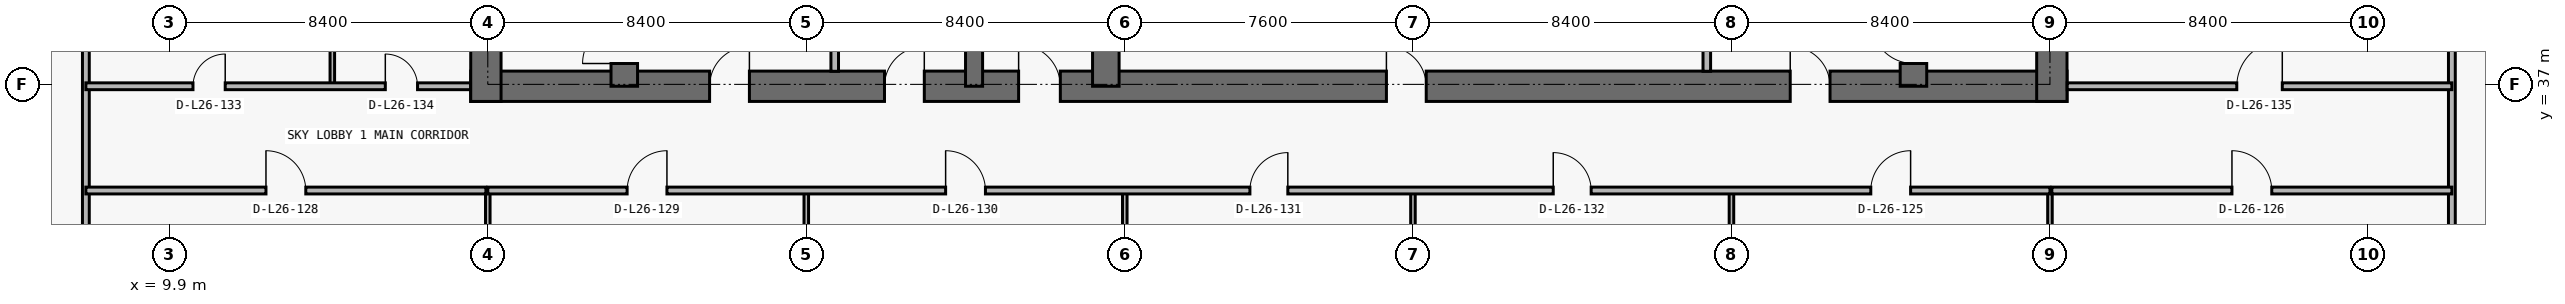
"""IFC4 building model, lengths in metres.
Left out: names, types, materials, properties, quantities, classifications, styles, units other than length and angle.
Written with IfcOpenShell. Run it as: python <this file> out.ifc"""

import sys

from ifc_helpers import new_model, si_unit, direction, frame, frame_2d, origin, place, context, subcontext, project, spatial, rectangle, extrude, element, fill, save


model = new_model("IFC4")
c1 = context("Model", 3, precision=1e-05, world=origin(), true_north=direction((0.0, 1.0)))
c2 = subcontext(c1, "Body", "Model", "MODEL_VIEW")
j1 = project(units=[si_unit("LENGTHUNIT", "METRE"), si_unit("PLANEANGLEUNIT", "RADIAN")], contexts=[c1])
p1 = place(None, origin())
s1 = spatial("IfcSite", under=j1, at=p1, CompositionType="ELEMENT")
p2 = place(p1, origin())
s2 = spatial("IfcBuilding", under=s1, at=p2, CompositionType="ELEMENT")
p3 = place(p2, frame((0.0, 0.0, 97.8)))
s3 = spatial("IfcBuildingStorey", under=s2, at=p3, CompositionType="ELEMENT", Elevation=97.8)
p4 = place(p3, frame((17.85, 36.95, 0.0), z_axis=(0.0, 0.0, 1.0), x_axis=(1.0, 0.0, 0.0)))
e1 = element("IfcWall", 1, at=p4, inside=s3, PredefinedType="SHEAR", context=c2, shape_type="SweptSolid", body=[
    extrude(rectangle(XDim=42.1, YDim=0.8, at=frame_2d((21.05, 0.0))), origin(), (0.0, 0.0, 1.0), 4.55),
])
p5 = place(p4, frame((14.45, 0.0, 0.0)))
e2 = element("IfcOpeningElement", 2, at=p5, cuts=e1, PredefinedType="OPENING", context=c2, shape_type="SweptSolid", body=[
    extrude(rectangle(XDim=1.1, YDim=2.15, at=frame_2d((0.55, 1.075))), frame((0.0, 0.41, 0.0), z_axis=(0.0, -1.0, 0.0), x_axis=(1.0, 0.0, 0.0)), (0.0, 0.0, 1.0), 0.82),
])
p6 = place(p4, frame((6.3, 0.0, 0.0)))
e3 = element("IfcOpeningElement", 3, at=p6, cuts=e1, PredefinedType="OPENING", context=c2, shape_type="SweptSolid", body=[
    extrude(rectangle(XDim=1.05, YDim=2.15, at=frame_2d((0.525, 1.075))), frame((0.0, 0.41, 0.0), z_axis=(0.0, -1.0, 0.0), x_axis=(1.0, 0.0, 0.0)), (0.0, 0.0, 1.0), 0.82),
])
p7 = place(p4, frame((34.8, 0.0, 0.0)))
e4 = element("IfcOpeningElement", 4, at=p7, cuts=e1, PredefinedType="OPENING", context=c2, shape_type="SweptSolid", body=[
    extrude(rectangle(XDim=1.05, YDim=2.15, at=frame_2d((0.525, 1.075))), frame((0.0, 0.41, 0.0), z_axis=(0.0, -1.0, 0.0), x_axis=(1.0, 0.0, 0.0)), (0.0, 0.0, 1.0), 0.82),
])
p8 = place(p4, frame((10.913, 0.0, 0.0)))
e5 = element("IfcOpeningElement", 5, at=p8, cuts=e1, PredefinedType="OPENING", context=c2, shape_type="SweptSolid", body=[
    extrude(rectangle(XDim=1.05, YDim=2.15, at=frame_2d((0.525, 1.075))), frame((0.0, 0.41, 0.0), z_axis=(0.0, -1.0, 0.0), x_axis=(1.0, 0.0, 0.0)), (0.0, 0.0, 1.0), 0.82),
])
p9 = place(p4, frame((24.15, 0.0, 0.0)))
e6 = element("IfcOpeningElement", 6, at=p9, cuts=e1, PredefinedType="OPENING", context=c2, shape_type="SweptSolid", body=[
    extrude(rectangle(XDim=1.05, YDim=2.15, at=frame_2d((0.525, 1.075))), frame((0.0, 0.41, 0.0), z_axis=(0.0, -1.0, 0.0), x_axis=(1.0, 0.0, 0.0)), (0.0, 0.0, 1.0), 0.82),
])
for number, where, z_axis, x_axis in (
    (7, (18.25, 36.55, 0.0), (0.0, 0.0, 1.0), (0.0, 1.0, 0.0)),
    (8, (59.55, 36.55, 0.0), (0.0, 0.0, 1.0), (0.0, 1.0, 0.0)),
):
    element("IfcWall", number, at=place(p3, frame(where, z_axis=z_axis, x_axis=x_axis)), inside=s3, PredefinedType="SHEAR", context=c2, shape_type="SweptSolid", body=[
        extrude(rectangle(XDim=14.05, YDim=0.8, at=frame_2d((7.025, 0.0))), origin(), (0.0, 0.0, 1.0), 4.55),
    ])
p10 = place(p3, frame((21.9, 36.95, 0.0), z_axis=(0.0, 0.0, 1.0), x_axis=(0.0, 1.0, 0.0)))
e9 = element("IfcWall", 9, at=p10, inside=s3, PredefinedType="SHEAR", context=c2, shape_type="SweptSolid", body=[
    extrude(rectangle(XDim=9.625, YDim=0.7, at=frame_2d((4.812, 0.0))), origin(), (0.0, 0.0, 1.0), 4.55),
])
p11 = place(p10, frame((0.6, 0.0, 0.0)))
e10 = element("IfcOpeningElement", 10, at=p11, cuts=e9, PredefinedType="OPENING", context=c2, shape_type="SweptSolid", body=[
    extrude(rectangle(XDim=1.1, YDim=2.15, at=frame_2d((0.55, 1.075))), frame((0.0, 0.36, 0.0), z_axis=(0.0, -1.0, 0.0), x_axis=(1.0, 0.0, 0.0)), (0.0, 0.0, 1.0), 0.72),
])
p12 = place(p3, frame((55.9, 36.95, 0.0), z_axis=(0.0, 0.0, 1.0), x_axis=(0.0, 1.0, 0.0)))
e11 = element("IfcWall", 11, at=p12, inside=s3, PredefinedType="SHEAR", context=c2, shape_type="SweptSolid", body=[
    extrude(rectangle(XDim=9.625, YDim=0.7, at=frame_2d((4.812, 0.0))), origin(), (0.0, 0.0, 1.0), 4.55),
])
p13 = place(p12, frame((0.6, 0.0, 0.0)))
e12 = element("IfcOpeningElement", 12, at=p13, cuts=e11, PredefinedType="OPENING", context=c2, shape_type="SweptSolid", body=[
    extrude(rectangle(XDim=1.1, YDim=2.15, at=frame_2d((0.55, 1.075))), frame((0.0, 0.36, 0.0), z_axis=(0.0, -1.0, 0.0), x_axis=(1.0, 0.0, 0.0)), (0.0, 0.0, 1.0), 0.72),
])
p14 = place(p3, frame((31.125, 36.95, 0.0), z_axis=(0.0, 0.0, 1.0), x_axis=(0.0, 1.0, 0.0)))
e13 = element("IfcWall", 13, at=p14, inside=s3, PredefinedType="SHEAR", context=c2, shape_type="SweptSolid", body=[
    extrude(rectangle(XDim=9.625, YDim=0.45, at=frame_2d((4.812, 0.0))), origin(), (0.0, 0.0, 1.0), 4.55),
])
p15 = place(p3, frame((34.6, 36.95, 0.0), z_axis=(0.0, 0.0, 1.0), x_axis=(0.0, 1.0, 0.0)))
e14 = element("IfcWall", 14, at=p15, inside=s3, PredefinedType="SHEAR", context=c2, shape_type="SweptSolid", body=[
    extrude(rectangle(XDim=9.625, YDim=0.7, at=frame_2d((4.812, 0.0))), origin(), (0.0, 0.0, 1.0), 4.55),
])
p16 = place(p3, frame((7.7, 8.885, 0.0), z_axis=(0.0, 0.0, 1.0), x_axis=(0.0, 1.0, 0.0)))
e15 = element("IfcWall", 15, at=p16, inside=s3, PredefinedType="PARTITIONING", context=c2, shape_type="SweptSolid", body=[
    extrude(rectangle(XDim=38.195, YDim=0.18, at=frame_2d((19.098, 0.0))), origin(), (0.0, 0.0, 1.0), 4.55),
])
p17 = place(p3, frame((14.2, 36.95, 0.0), z_axis=(0.0, 0.0, 1.0), x_axis=(0.0, 1.0, 0.0)))
e16 = element("IfcWall", 16, at=p17, inside=s3, PredefinedType="PARTITIONING", context=c2, shape_type="SweptSolid", body=[
    extrude(rectangle(XDim=6.85, YDim=0.12, at=frame_2d((3.425, 0.0))), origin(), (0.0, 0.0, 1.0), 3.923),
])
p18 = place(p3, frame((18.3, 5.655, 0.0), z_axis=(0.0, 0.0, 1.0), x_axis=(0.0, 1.0, 0.0)))
e17 = element("IfcWall", 17, at=p18, inside=s3, PredefinedType="PARTITIONING", context=c2, shape_type="SweptSolid", body=[
    extrude(rectangle(XDim=28.545, YDim=0.12, at=frame_2d((14.272, 0.0))), origin(), (0.0, 0.0, 1.0), 3.514),
])
p19 = place(p3, frame((26.7, 29.405, 0.0), z_axis=(0.0, 0.0, 1.0), x_axis=(0.0, 1.0, 0.0)))
e18 = element("IfcWall", 18, at=p19, inside=s3, PredefinedType="PARTITIONING", context=c2, shape_type="SweptSolid", body=[
    extrude(rectangle(XDim=4.795, YDim=0.12, at=frame_2d((2.397, 0.0))), origin(), (0.0, 0.0, 1.0), 3.835),
])
p20 = place(p3, frame((27.45, 37.345, 0.0), z_axis=(0.0, 0.0, 1.0), x_axis=(0.0, 1.0, 0.0)))
e19 = element("IfcWall", 19, at=p20, inside=s3, PredefinedType="PARTITIONING", context=c2, shape_type="SweptSolid", body=[
    extrude(rectangle(XDim=5.385, YDim=0.2, at=frame_2d((2.692, 0.0))), origin(), (0.0, 0.0, 1.0), 4.55),
])
for number, where, z_axis, x_axis in (
    (20, (35.1, 5.655, 0.0), (0.0, 0.0, 1.0), (0.0, 1.0, 0.0)),
    (21, (42.7, 5.655, 0.0), (0.0, 0.0, 1.0), (0.0, 1.0, 0.0)),
):
    element("IfcWall", number, at=place(p3, frame(where, z_axis=z_axis, x_axis=x_axis)), inside=s3, PredefinedType="PARTITIONING", context=c2, shape_type="SweptSolid", body=[
        extrude(rectangle(XDim=28.545, YDim=0.12, at=frame_2d((14.272, 0.0))), origin(), (0.0, 0.0, 1.0), 3.514),
    ])
p21 = place(p3, frame((50.45, 37.345, 0.0), z_axis=(0.0, 0.0, 1.0), x_axis=(0.0, 1.0, 0.0)))
e22 = element("IfcWall", 22, at=p21, inside=s3, PredefinedType="PARTITIONING", context=c2, shape_type="SweptSolid", body=[
    extrude(rectangle(XDim=5.385, YDim=0.2, at=frame_2d((2.692, 0.0))), origin(), (0.0, 0.0, 1.0), 4.55),
])
p22 = place(p3, frame((51.1, 29.405, 0.0), z_axis=(0.0, 0.0, 1.0), x_axis=(0.0, 1.0, 0.0)))
e23 = element("IfcWall", 23, at=p22, inside=s3, PredefinedType="PARTITIONING", context=c2, shape_type="SweptSolid", body=[
    extrude(rectangle(XDim=4.795, YDim=0.12, at=frame_2d((2.397, 0.0))), origin(), (0.0, 0.0, 1.0), 3.835),
])
p23 = place(p3, frame((59.5, 5.655, 0.0), z_axis=(0.0, 0.0, 1.0), x_axis=(0.0, 1.0, 0.0)))
e24 = element("IfcWall", 24, at=p23, inside=s3, PredefinedType="PARTITIONING", context=c2, shape_type="SweptSolid", body=[
    extrude(rectangle(XDim=28.545, YDim=0.12, at=frame_2d((14.272, 0.0))), origin(), (0.0, 0.0, 1.0), 3.514),
])
p24 = place(p3, frame((70.1, 8.92, 0.0), z_axis=(0.0, 0.0, 1.0), x_axis=(0.0, 1.0, 0.0)))
e25 = element("IfcWall", 25, at=p24, inside=s3, PredefinedType="PARTITIONING", context=c2, shape_type="SweptSolid", body=[
    extrude(rectangle(XDim=38.16, YDim=0.18, at=frame_2d((19.08, 0.0))), origin(), (0.0, 0.0, 1.0), 4.55),
])
p25 = place(p3, frame((7.7, 34.2, 0.0), z_axis=(0.0, 0.0, 1.0), x_axis=(1.0, 0.0, 0.0)))
e26 = element("IfcWall", 26, at=p25, inside=s3, PredefinedType="PARTITIONING", context=c2, shape_type="SweptSolid", body=[
    extrude(rectangle(XDim=10.55, YDim=0.18, at=frame_2d((5.275, 0.0))), origin(), (0.0, 0.0, 1.0), 4.55),
])
p26 = place(p25, frame((4.75, 0.0, 0.0)))
e27 = element("IfcOpeningElement", 27, at=p26, cuts=e26, PredefinedType="OPENING", context=c2, shape_type="SweptSolid", body=[
    extrude(rectangle(XDim=1.05, YDim=2.15, at=frame_2d((0.525, 1.075))), frame((0.0, 0.1, 0.0), z_axis=(0.0, -1.0, 0.0), x_axis=(1.0, 0.0, 0.0)), (0.0, 0.0, 1.0), 0.2),
])
p27 = place(p3, frame((18.3, 34.2, 0.0), z_axis=(0.0, 0.0, 1.0), x_axis=(1.0, 0.0, 0.0)))
e28 = element("IfcWall", 28, at=p27, inside=s3, PredefinedType="PARTITIONING", context=c2, shape_type="SweptSolid", body=[
    extrude(rectangle(XDim=41.2, YDim=0.18, at=frame_2d((20.6, 0.0))), origin(), (0.0, 0.0, 1.0), 4.55),
])
p28 = place(p27, frame((36.475, 0.0, 0.0)))
e29 = element("IfcOpeningElement", 29, at=p28, cuts=e28, PredefinedType="OPENING", context=c2, shape_type="SweptSolid", body=[
    extrude(rectangle(XDim=1.05, YDim=2.15, at=frame_2d((0.525, 1.075))), frame((0.0, 0.1, 0.0), z_axis=(0.0, -1.0, 0.0), x_axis=(1.0, 0.0, 0.0)), (0.0, 0.0, 1.0), 0.2),
])
p29 = place(p27, frame((3.675, 0.0, 0.0)))
e30 = element("IfcOpeningElement", 30, at=p29, cuts=e28, PredefinedType="OPENING", context=c2, shape_type="SweptSolid", body=[
    extrude(rectangle(XDim=1.05, YDim=2.15, at=frame_2d((0.525, 1.075))), frame((0.0, 0.1, 0.0), z_axis=(0.0, -1.0, 0.0), x_axis=(1.0, 0.0, 0.0)), (0.0, 0.0, 1.0), 0.2),
])
p30 = place(p27, frame((12.075, 0.0, 0.0)))
e31 = element("IfcOpeningElement", 31, at=p30, cuts=e28, PredefinedType="OPENING", context=c2, shape_type="SweptSolid", body=[
    extrude(rectangle(XDim=1.05, YDim=2.15, at=frame_2d((0.525, 1.075))), frame((0.0, 0.1, 0.0), z_axis=(0.0, -1.0, 0.0), x_axis=(1.0, 0.0, 0.0)), (0.0, 0.0, 1.0), 0.2),
])
p31 = place(p27, frame((20.1, 0.0, 0.0)))
e32 = element("IfcOpeningElement", 32, at=p31, cuts=e28, PredefinedType="OPENING", context=c2, shape_type="SweptSolid", body=[
    extrude(rectangle(XDim=1.0, YDim=2.2, at=frame_2d((0.5, 1.1))), frame((0.0, 0.1, 0.0), z_axis=(0.0, -1.0, 0.0), x_axis=(1.0, 0.0, 0.0)), (0.0, 0.0, 1.0), 0.2),
])
p32 = place(p27, frame((28.1, 0.0, 0.0)))
e33 = element("IfcOpeningElement", 33, at=p32, cuts=e28, PredefinedType="OPENING", context=c2, shape_type="SweptSolid", body=[
    extrude(rectangle(XDim=1.0, YDim=2.2, at=frame_2d((0.5, 1.1))), frame((0.0, 0.1, 0.0), z_axis=(0.0, -1.0, 0.0), x_axis=(1.0, 0.0, 0.0)), (0.0, 0.0, 1.0), 0.2),
])
p33 = place(p3, frame((59.55, 34.2, 0.0), z_axis=(0.0, 0.0, 1.0), x_axis=(1.0, 0.0, 0.0)))
e34 = element("IfcWall", 34, at=p33, inside=s3, PredefinedType="PARTITIONING", context=c2, shape_type="SweptSolid", body=[
    extrude(rectangle(XDim=10.55, YDim=0.18, at=frame_2d((5.275, 0.0))), origin(), (0.0, 0.0, 1.0), 4.55),
])
p34 = place(p33, frame((4.75, 0.0, 0.0)))
e35 = element("IfcOpeningElement", 35, at=p34, cuts=e34, PredefinedType="OPENING", context=c2, shape_type="SweptSolid", body=[
    extrude(rectangle(XDim=1.05, YDim=2.15, at=frame_2d((0.525, 1.075))), frame((0.0, 0.1, 0.0), z_axis=(0.0, -1.0, 0.0), x_axis=(1.0, 0.0, 0.0)), (0.0, 0.0, 1.0), 0.2),
])
p35 = place(p3, frame((7.7, 36.95, 0.0), z_axis=(0.0, 0.0, 1.0), x_axis=(1.0, 0.0, 0.0)))
e36 = element("IfcWall", 36, at=p35, inside=s3, PredefinedType="PARTITIONING", context=c2, shape_type="SweptSolid", body=[
    extrude(rectangle(XDim=10.145, YDim=0.18, at=frame_2d((5.073, 0.0))), origin(), (0.0, 0.0, 1.0), 4.55),
])
p36 = place(p35, frame((2.825, 0.0, 0.0)))
e37 = element("IfcOpeningElement", 37, at=p36, cuts=e36, PredefinedType="OPENING", context=c2, shape_type="SweptSolid", body=[
    extrude(rectangle(XDim=0.85, YDim=2.1, at=frame_2d((0.425, 1.05))), frame((0.0, 0.1, 0.0), z_axis=(0.0, -1.0, 0.0), x_axis=(1.0, 0.0, 0.0)), (0.0, 0.0, 1.0), 0.2),
])
p37 = place(p35, frame((7.897, 0.0, 0.0)))
e38 = element("IfcOpeningElement", 38, at=p37, cuts=e36, PredefinedType="OPENING", context=c2, shape_type="SweptSolid", body=[
    extrude(rectangle(XDim=0.85, YDim=2.1, at=frame_2d((0.425, 1.05))), frame((0.0, 0.1, 0.0), z_axis=(0.0, -1.0, 0.0), x_axis=(1.0, 0.0, 0.0)), (0.0, 0.0, 1.0), 0.2),
])
p38 = place(p3, frame((59.955, 36.95, 0.0), z_axis=(0.0, 0.0, 1.0), x_axis=(1.0, 0.0, 0.0)))
e39 = element("IfcWall", 39, at=p38, inside=s3, PredefinedType="PARTITIONING", context=c2, shape_type="SweptSolid", body=[
    extrude(rectangle(XDim=10.145, YDim=0.18, at=frame_2d((5.073, 0.0))), origin(), (0.0, 0.0, 1.0), 4.55),
])
p39 = place(p38, frame((4.472, 0.0, 0.0)))
e40 = element("IfcOpeningElement", 40, at=p39, cuts=e39, PredefinedType="OPENING", context=c2, shape_type="SweptSolid", body=[
    extrude(rectangle(XDim=1.2, YDim=2.2, at=frame_2d((0.6, 1.1))), frame((0.0, 0.1, 0.0), z_axis=(0.0, -1.0, 0.0), x_axis=(1.0, 0.0, 0.0)), (0.0, 0.0, 1.0), 0.2),
])
p40 = place(p5, origin())
e41 = element("IfcDoor", 41, at=p40, inside=s3, OperationType="SINGLE_SWING_LEFT", PredefinedType="DOOR", context=c2, shape_type="SweptSolid", body=[
    extrude(rectangle(XDim=1.1, YDim=2.15, at=frame_2d((0.55, 1.075))), frame((0.0, 0.025, 0.0), z_axis=(0.0, -1.0, 0.0), x_axis=(1.0, 0.0, 0.0)), (0.0, 0.0, 1.0), 0.05),
])
fill(e2, e41)
p41 = place(p6, origin())
e42 = element("IfcDoor", 42, at=p41, inside=s3, OperationType="SINGLE_SWING_RIGHT", PredefinedType="DOOR", context=c2, shape_type="SweptSolid", body=[
    extrude(rectangle(XDim=1.05, YDim=2.15, at=frame_2d((0.525, 1.075))), frame((0.0, 0.025, 0.0), z_axis=(0.0, -1.0, 0.0), x_axis=(1.0, 0.0, 0.0)), (0.0, 0.0, 1.0), 0.05),
])
fill(e3, e42)
p42 = place(p11, origin())
e43 = element("IfcDoor", 43, at=p42, inside=s3, OperationType="SINGLE_SWING_LEFT", PredefinedType="DOOR", context=c2, shape_type="SweptSolid", body=[
    extrude(rectangle(XDim=1.1, YDim=2.15, at=frame_2d((0.55, 1.075))), frame((0.0, 0.025, 0.0), z_axis=(0.0, -1.0, 0.0), x_axis=(1.0, 0.0, 0.0)), (0.0, 0.0, 1.0), 0.05),
])
fill(e10, e43)
p43 = place(p7, origin())
e44 = element("IfcDoor", 44, at=p43, inside=s3, OperationType="SINGLE_SWING_LEFT", PredefinedType="DOOR", context=c2, shape_type="SweptSolid", body=[
    extrude(rectangle(XDim=1.05, YDim=2.15, at=frame_2d((0.525, 1.075))), frame((0.0, 0.025, 0.0), z_axis=(0.0, -1.0, 0.0), x_axis=(1.0, 0.0, 0.0)), (0.0, 0.0, 1.0), 0.05),
])
fill(e4, e44)
p44 = place(p13, origin())
e45 = element("IfcDoor", 45, at=p44, inside=s3, OperationType="SINGLE_SWING_RIGHT", PredefinedType="DOOR", context=c2, shape_type="SweptSolid", body=[
    extrude(rectangle(XDim=1.1, YDim=2.15, at=frame_2d((0.55, 1.075))), frame((0.0, 0.025, 0.0), z_axis=(0.0, -1.0, 0.0), x_axis=(1.0, 0.0, 0.0)), (0.0, 0.0, 1.0), 0.05),
])
fill(e12, e45)
p45 = place(p8, origin())
e46 = element("IfcDoor", 46, at=p45, inside=s3, OperationType="SINGLE_SWING_RIGHT", PredefinedType="DOOR", context=c2, shape_type="SweptSolid", body=[
    extrude(rectangle(XDim=1.05, YDim=2.15, at=frame_2d((0.525, 1.075))), frame((0.0, 0.025, 0.0), z_axis=(0.0, -1.0, 0.0), x_axis=(1.0, 0.0, 0.0)), (0.0, 0.0, 1.0), 0.05),
])
fill(e5, e46)
p46 = place(p9, origin())
e47 = element("IfcDoor", 47, at=p46, inside=s3, OperationType="SINGLE_SWING_LEFT", PredefinedType="DOOR", context=c2, shape_type="SweptSolid", body=[
    extrude(rectangle(XDim=1.05, YDim=2.15, at=frame_2d((0.525, 1.075))), frame((0.0, 0.025, 0.0), z_axis=(0.0, -1.0, 0.0), x_axis=(1.0, 0.0, 0.0)), (0.0, 0.0, 1.0), 0.05),
])
fill(e6, e47)
p47 = place(p28, origin())
e48 = element("IfcDoor", 48, at=p47, inside=s3, OperationType="SINGLE_SWING_RIGHT", PredefinedType="DOOR", context=c2, shape_type="SweptSolid", body=[
    extrude(rectangle(XDim=1.05, YDim=2.15, at=frame_2d((0.525, 1.075))), frame((0.0, 0.025, 0.0), z_axis=(0.0, -1.0, 0.0), x_axis=(1.0, 0.0, 0.0)), (0.0, 0.0, 1.0), 0.05),
])
fill(e29, e48)
p48 = place(p34, origin())
e49 = element("IfcDoor", 49, at=p48, inside=s3, OperationType="SINGLE_SWING_LEFT", PredefinedType="DOOR", context=c2, shape_type="SweptSolid", body=[
    extrude(rectangle(XDim=1.05, YDim=2.15, at=frame_2d((0.525, 1.075))), frame((0.0, 0.025, 0.0), z_axis=(0.0, -1.0, 0.0), x_axis=(1.0, 0.0, 0.0)), (0.0, 0.0, 1.0), 0.05),
])
fill(e35, e49)
p49 = place(p26, origin())
e50 = element("IfcDoor", 50, at=p49, inside=s3, OperationType="SINGLE_SWING_LEFT", PredefinedType="DOOR", context=c2, shape_type="SweptSolid", body=[
    extrude(rectangle(XDim=1.05, YDim=2.15, at=frame_2d((0.525, 1.075))), frame((0.0, 0.025, 0.0), z_axis=(0.0, -1.0, 0.0), x_axis=(1.0, 0.0, 0.0)), (0.0, 0.0, 1.0), 0.05),
])
fill(e27, e50)
p50 = place(p29, origin())
e51 = element("IfcDoor", 51, at=p50, inside=s3, OperationType="SINGLE_SWING_RIGHT", PredefinedType="DOOR", context=c2, shape_type="SweptSolid", body=[
    extrude(rectangle(XDim=1.05, YDim=2.15, at=frame_2d((0.525, 1.075))), frame((0.0, 0.025, 0.0), z_axis=(0.0, -1.0, 0.0), x_axis=(1.0, 0.0, 0.0)), (0.0, 0.0, 1.0), 0.05),
])
fill(e30, e51)
p51 = place(p30, origin())
e52 = element("IfcDoor", 52, at=p51, inside=s3, OperationType="SINGLE_SWING_LEFT", PredefinedType="DOOR", context=c2, shape_type="SweptSolid", body=[
    extrude(rectangle(XDim=1.05, YDim=2.15, at=frame_2d((0.525, 1.075))), frame((0.0, 0.025, 0.0), z_axis=(0.0, -1.0, 0.0), x_axis=(1.0, 0.0, 0.0)), (0.0, 0.0, 1.0), 0.05),
])
fill(e31, e52)
p52 = place(p31, origin())
e53 = element("IfcDoor", 53, at=p52, inside=s3, OperationType="SINGLE_SWING_RIGHT", PredefinedType="DOOR", context=c2, shape_type="SweptSolid", body=[
    extrude(rectangle(XDim=1.0, YDim=2.2, at=frame_2d((0.5, 1.1))), frame((0.0, 0.025, 0.0), z_axis=(0.0, -1.0, 0.0), x_axis=(1.0, 0.0, 0.0)), (0.0, 0.0, 1.0), 0.05),
])
fill(e32, e53)
p53 = place(p32, origin())
e54 = element("IfcDoor", 54, at=p53, inside=s3, OperationType="SINGLE_SWING_LEFT", PredefinedType="DOOR", context=c2, shape_type="SweptSolid", body=[
    extrude(rectangle(XDim=1.0, YDim=2.2, at=frame_2d((0.5, 1.1))), frame((0.0, 0.025, 0.0), z_axis=(0.0, -1.0, 0.0), x_axis=(1.0, 0.0, 0.0)), (0.0, 0.0, 1.0), 0.05),
])
fill(e33, e54)
p54 = place(p36, origin())
e55 = element("IfcDoor", 55, at=p54, inside=s3, OperationType="SINGLE_SWING_RIGHT", PredefinedType="DOOR", context=c2, shape_type="SweptSolid", body=[
    extrude(rectangle(XDim=0.85, YDim=2.1, at=frame_2d((0.425, 1.05))), frame((0.0, 0.025, 0.0), z_axis=(0.0, -1.0, 0.0), x_axis=(1.0, 0.0, 0.0)), (0.0, 0.0, 1.0), 0.05),
])
fill(e37, e55)
p55 = place(p37, origin())
e56 = element("IfcDoor", 56, at=p55, inside=s3, OperationType="SINGLE_SWING_LEFT", PredefinedType="DOOR", context=c2, shape_type="SweptSolid", body=[
    extrude(rectangle(XDim=0.85, YDim=2.1, at=frame_2d((0.425, 1.05))), frame((0.0, 0.025, 0.0), z_axis=(0.0, -1.0, 0.0), x_axis=(1.0, 0.0, 0.0)), (0.0, 0.0, 1.0), 0.05),
])
fill(e38, e56)
p56 = place(p39, origin())
e57 = element("IfcDoor", 57, at=p56, inside=s3, OperationType="SINGLE_SWING_RIGHT", PredefinedType="DOOR", context=c2, shape_type="SweptSolid", body=[
    extrude(rectangle(XDim=1.2, YDim=2.2, at=frame_2d((0.6, 1.1))), frame((0.0, 0.025, 0.0), z_axis=(0.0, -1.0, 0.0), x_axis=(1.0, 0.0, 0.0)), (0.0, 0.0, 1.0), 0.05),
])
fill(e40, e57)
save(model, sys.argv[1])
